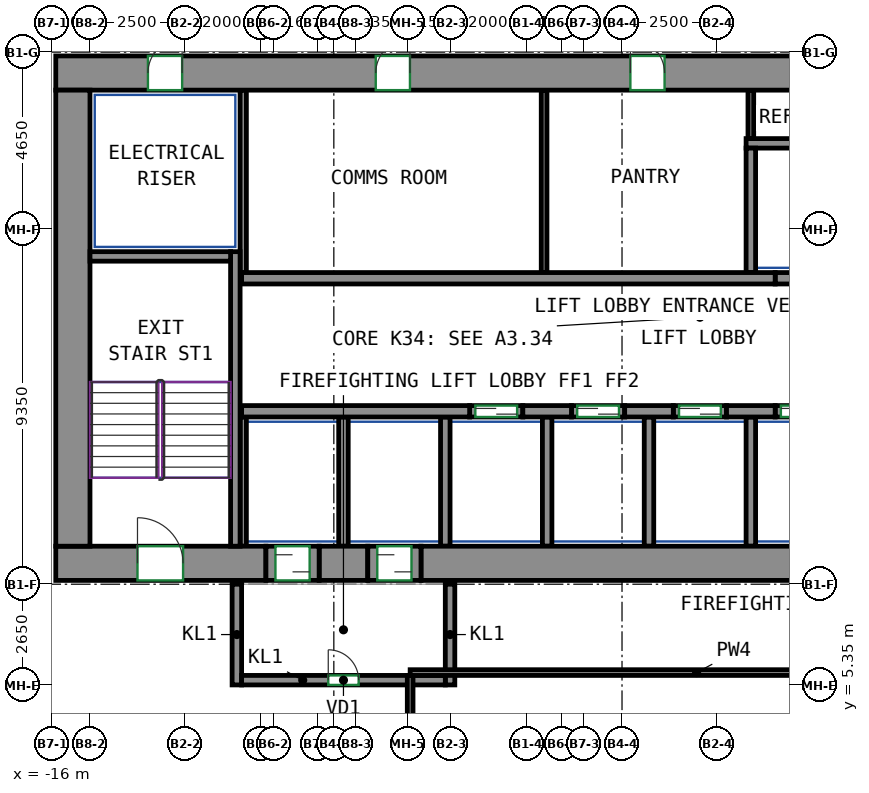
"""IFC4 building model, lengths in metres.
Left out: names, types, materials, properties, quantities, classifications, styles, units other than length and angle.
Written with IfcOpenShell. Run it as: python <this file> out.ifc"""

import sys

from ifc_helpers import new_model, si_unit, direction, frame, frame_2d, origin, place, context, subcontext, project, spatial, rectangle, extrude, source, transform, mapped, element, fill, save


model = new_model("IFC4")
c1 = context("Model", 3, precision=1e-05, world=origin(), true_north=direction((0.0, 1.0)))
c2 = subcontext(c1, "Body", "Model", "MODEL_VIEW")
j1 = project(units=[si_unit("LENGTHUNIT", "METRE"), si_unit("PLANEANGLEUNIT", "RADIAN")], contexts=[c1])
p1 = place(None, origin())
s1 = spatial("IfcSite", under=j1, at=p1, CompositionType="ELEMENT")
p2 = place(p1, origin())
s2 = spatial("IfcBuilding", under=s1, at=p2, CompositionType="ELEMENT")
p3 = place(p2, frame((0.0, 0.0, 147.3)))
s3 = spatial("IfcBuildingStorey", under=s2, at=p3, CompositionType="ELEMENT", Elevation=147.3)
m1 = source(origin(), c2, "Body", "SweptSolid", [
    extrude(rectangle(XDim=5.53, YDim=0.9, at=frame_2d((2.765, 0.0))), origin(), (0.0, 0.0, 1.0), 3.12),
])
p4 = place(p3, frame((-15.9, 8.55, 0.0), z_axis=(0.0, 0.0, 1.0), x_axis=(1.0, 0.0, 0.0)))
e1 = element("IfcWall", 1, at=p4, inside=s3, PredefinedType="SHEAR", context=c2, shape_type="MappedRepresentation", body=[
    mapped(m1, transform((0.0, 0.0, 0.0))),
])
p5 = place(p4, frame((2.15, 0.0, 0.0)))
e2 = element("IfcOpeningElement", 2, at=p5, cuts=e1, PredefinedType="OPENING", context=c2, shape_type="SweptSolid", body=[
    extrude(rectangle(XDim=1.2, YDim=2.1, at=frame_2d((0.6, 1.05))), frame((0.0, 0.46, 0.0), z_axis=(0.0, -1.0, 0.0), x_axis=(1.0, 0.0, 0.0)), (0.0, 0.0, 1.0), 0.92),
])
m2 = source(origin(), c2, "Body", "SweptSolid", [
    extrude(rectangle(XDim=1.28, YDim=0.9, at=frame_2d((0.64, 0.0))), origin(), (0.0, 0.0, 1.0), 3.12),
])
p6 = place(p3, frame((-8.97, 8.55, 0.0), z_axis=(0.0, 0.0, 1.0), x_axis=(1.0, 0.0, 0.0)))
e3 = element("IfcWall", 3, at=p6, inside=s3, PredefinedType="SHEAR", context=c2, shape_type="MappedRepresentation", body=[
    mapped(m2, transform((0.0, 0.0, 0.0))),
])
m3 = source(origin(), c2, "Body", "SweptSolid", [
    extrude(rectangle(XDim=14.18, YDim=0.9, at=frame_2d((7.09, 0.0))), origin(), (0.0, 0.0, 1.0), 3.12),
])
p7 = place(p3, frame((-6.29, 8.55, 0.0), z_axis=(0.0, 0.0, 1.0), x_axis=(1.0, 0.0, 0.0)))
e4 = element("IfcWall", 4, at=p7, inside=s3, PredefinedType="SHEAR", context=c2, shape_type="MappedRepresentation", body=[
    mapped(m3, transform((0.0, 0.0, 0.0))),
])
m4 = source(origin(), c2, "Body", "SweptSolid", [
    extrude(rectangle(XDim=33.9, YDim=0.9, at=frame_2d((16.95, 0.0))), origin(), (0.0, 0.0, 1.0), 3.12),
])
p8 = place(p3, frame((-15.9, 21.45, 0.0), z_axis=(0.0, 0.0, 1.0), x_axis=(1.0, 0.0, 0.0)))
e5 = element("IfcWall", 5, at=p8, inside=s3, PredefinedType="SHEAR", context=c2, shape_type="MappedRepresentation", body=[
    mapped(m4, transform((0.0, 0.0, 0.0))),
])
p9 = place(p8, frame((8.42, 0.0, 0.0)))
e6 = element("IfcOpeningElement", 6, at=p9, cuts=e5, PredefinedType="OPENING", context=c2, shape_type="SweptSolid", body=[
    extrude(rectangle(XDim=0.9, YDim=2.1, at=frame_2d((0.45, 1.05))), frame((0.0, 0.46, 0.0), z_axis=(0.0, -1.0, 0.0), x_axis=(1.0, 0.0, 0.0)), (0.0, 0.0, 1.0), 0.92),
])
p10 = place(p8, frame((15.12, 0.0, 0.0)))
e7 = element("IfcOpeningElement", 7, at=p10, cuts=e5, PredefinedType="OPENING", context=c2, shape_type="SweptSolid", body=[
    extrude(rectangle(XDim=0.9, YDim=2.1, at=frame_2d((0.45, 1.05))), frame((0.0, 0.46, 0.0), z_axis=(0.0, -1.0, 0.0), x_axis=(1.0, 0.0, 0.0)), (0.0, 0.0, 1.0), 0.92),
])
p11 = place(p8, frame((19.944, 0.0, 0.0)))
e8 = element("IfcOpeningElement", 8, at=p11, cuts=e5, PredefinedType="OPENING", context=c2, shape_type="SweptSolid", body=[
    extrude(rectangle(XDim=0.9, YDim=2.1, at=frame_2d((0.45, 1.05))), frame((0.0, 0.46, 0.0), z_axis=(0.0, -1.0, 0.0), x_axis=(1.0, 0.0, 0.0)), (0.0, 0.0, 1.0), 0.92),
])
p12 = place(p8, frame((25.304, 0.0, 0.0)))
e9 = element("IfcOpeningElement", 9, at=p12, cuts=e5, PredefinedType="OPENING", context=c2, shape_type="SweptSolid", body=[
    extrude(rectangle(XDim=0.9, YDim=2.1, at=frame_2d((0.45, 1.05))), frame((0.0, 0.46, 0.0), z_axis=(0.0, -1.0, 0.0), x_axis=(1.0, 0.0, 0.0)), (0.0, 0.0, 1.0), 0.92),
])
p13 = place(p8, frame((2.425, 0.0, 0.0)))
e10 = element("IfcOpeningElement", 10, at=p13, cuts=e5, PredefinedType="OPENING", context=c2, shape_type="SweptSolid", body=[
    extrude(rectangle(XDim=0.9, YDim=2.1, at=frame_2d((0.45, 1.05))), frame((0.0, 0.46, 0.0), z_axis=(0.0, -1.0, 0.0), x_axis=(1.0, 0.0, 0.0)), (0.0, 0.0, 1.0), 0.92),
])
p14 = place(p8, frame((30.575, 0.0, 0.0)))
e11 = element("IfcOpeningElement", 11, at=p14, cuts=e5, PredefinedType="OPENING", context=c2, shape_type="SweptSolid", body=[
    extrude(rectangle(XDim=0.9, YDim=2.1, at=frame_2d((0.45, 1.05))), frame((0.0, 0.46, 0.0), z_axis=(0.0, -1.0, 0.0), x_axis=(1.0, 0.0, 0.0)), (0.0, 0.0, 1.0), 0.92),
])
m5 = source(origin(), c2, "Body", "SweptSolid", [
    extrude(rectangle(XDim=12.0, YDim=0.9, at=frame_2d((6.0, 0.0))), origin(), (0.0, 0.0, 1.0), 3.12),
])
p15 = place(p3, frame((-15.45, 9.0, 0.0), z_axis=(0.0, 0.0, 1.0), x_axis=(0.0, 1.0, 0.0)))
e12 = element("IfcWall", 12, at=p15, inside=s3, PredefinedType="SHEAR", context=c2, shape_type="MappedRepresentation", body=[
    mapped(m5, transform((0.0, 0.0, 0.0))),
])
m6 = source(origin(), c2, "Body", "SweptSolid", [
    extrude(rectangle(XDim=7.75, YDim=0.25, at=frame_2d((3.875, 0.0))), origin(), (0.0, 0.0, 1.0), 3.12),
])
p16 = place(p3, frame((-11.175, 9.0, 0.0), z_axis=(0.0, 0.0, 1.0), x_axis=(0.0, 1.0, 0.0)))
e13 = element("IfcWall", 13, at=p16, inside=s3, PredefinedType="SHEAR", context=c2, shape_type="MappedRepresentation", body=[
    mapped(m6, transform((0.0, 0.0, 0.0))),
])
m7 = source(origin(), c2, "Body", "SweptSolid", [
    extrude(rectangle(XDim=3.7, YDim=0.25, at=frame_2d((1.85, 0.0))), origin(), (0.0, 0.0, 1.0), 3.12),
])
p17 = place(p3, frame((-15.0, 16.625, 0.0), z_axis=(0.0, 0.0, 1.0), x_axis=(1.0, 0.0, 0.0)))
e14 = element("IfcWall", 14, at=p17, inside=s3, PredefinedType="SHEAR", context=c2, shape_type="MappedRepresentation", body=[
    mapped(m7, transform((0.0, 0.0, 0.0))),
])
m8 = source(origin(), c2, "Body", "SweptSolid", [
    extrude(rectangle(XDim=6.0, YDim=0.3, at=frame_2d((3.0, 0.0))), origin(), (0.0, 0.0, 1.0), 3.12),
])
p18 = place(p3, frame((-11.01, 12.55, 0.0), z_axis=(0.0, 0.0, 1.0), x_axis=(1.0, 0.0, 0.0)))
e15 = element("IfcWall", 15, at=p18, inside=s3, PredefinedType="SHEAR", context=c2, shape_type="MappedRepresentation", body=[
    mapped(m8, transform((0.0, 0.0, 0.0))),
])
m9 = source(origin(), c2, "Body", "SweptSolid", [
    extrude(rectangle(XDim=1.28, YDim=0.3, at=frame_2d((0.64, 0.0))), origin(), (0.0, 0.0, 1.0), 3.12),
])
for number, where, z_axis, x_axis in (
    (16, (-3.61, 12.55, 0.0), (0.0, 0.0, 1.0), (1.0, 0.0, 0.0)),
    (17, (-0.93, 12.55, 0.0), (0.0, 0.0, 1.0), (1.0, 0.0, 0.0)),
    (18, (1.75, 12.55, 0.0), (0.0, 0.0, 1.0), (1.0, 0.0, 0.0)),
):
    element("IfcWall", number, at=place(p3, frame(where, z_axis=z_axis, x_axis=x_axis)), inside=s3, PredefinedType="SHEAR", context=c2, shape_type="MappedRepresentation", body=[
        mapped(m9, transform((0.0, 0.0, 0.0))),
    ])
m10 = source(origin(), c2, "Body", "SweptSolid", [
    extrude(rectangle(XDim=14.04, YDim=0.3, at=frame_2d((7.02, 0.0))), origin(), (0.0, 0.0, 1.0), 3.12),
])
p19 = place(p3, frame((-11.01, 16.05, 0.0), z_axis=(0.0, 0.0, 1.0), x_axis=(1.0, 0.0, 0.0)))
e19 = element("IfcWall", 19, at=p19, inside=s3, PredefinedType="SHEAR", context=c2, shape_type="MappedRepresentation", body=[
    mapped(m10, transform((0.0, 0.0, 0.0))),
])
m11 = source(origin(), c2, "Body", "SweptSolid", [
    extrude(rectangle(XDim=1.4, YDim=0.3, at=frame_2d((0.7, 0.0))), origin(), (0.0, 0.0, 1.0), 3.12),
])
p20 = place(p3, frame((-5.01, 12.55, 0.0), z_axis=(0.0, 0.0, 1.0), x_axis=(1.0, 0.0, 0.0)))
e20 = element("IfcWall", 20, at=p20, inside=s3, PredefinedType="PARTITIONING", context=c2, shape_type="MappedRepresentation", body=[
    mapped(m11, transform((0.0, 0.0, 0.0))),
])
p21 = place(p20, frame((0.15, 0.0, 0.0)))
e21 = element("IfcOpeningElement", 21, at=p21, cuts=e20, PredefinedType="OPENING", context=c2, shape_type="SweptSolid", body=[
    extrude(rectangle(XDim=1.1, YDim=2.1, at=frame_2d((0.55, 1.05))), frame((0.0, 0.16, 0.0), z_axis=(0.0, -1.0, 0.0), x_axis=(1.0, 0.0, 0.0)), (0.0, 0.0, 1.0), 0.32),
])
m12 = source(origin(), c2, "Body", "SweptSolid", [
    extrude(rectangle(XDim=1.4, YDim=0.3, at=frame_2d((0.7, 0.0))), origin(), (0.0, 0.0, 1.0), 3.12),
])
p22 = place(p3, frame((-2.33, 12.55, 0.0), z_axis=(0.0, 0.0, 1.0), x_axis=(1.0, 0.0, 0.0)))
e22 = element("IfcWall", 22, at=p22, inside=s3, PredefinedType="PARTITIONING", context=c2, shape_type="MappedRepresentation", body=[
    mapped(m12, transform((0.0, 0.0, 0.0))),
])
p23 = place(p22, frame((0.15, 0.0, 0.0)))
e23 = element("IfcOpeningElement", 23, at=p23, cuts=e22, PredefinedType="OPENING", context=c2, shape_type="SweptSolid", body=[
    extrude(rectangle(XDim=1.1, YDim=2.1, at=frame_2d((0.55, 1.05))), frame((0.0, 0.16, 0.0), z_axis=(0.0, -1.0, 0.0), x_axis=(1.0, 0.0, 0.0)), (0.0, 0.0, 1.0), 0.32),
])
p24 = place(p3, frame((0.35, 12.55, 0.0), z_axis=(0.0, 0.0, 1.0), x_axis=(1.0, 0.0, 0.0)))
e24 = element("IfcWall", 24, at=p24, inside=s3, PredefinedType="PARTITIONING", context=c2, shape_type="MappedRepresentation", body=[
    mapped(m11, transform((0.0, 0.0, 0.0))),
])
p25 = place(p24, frame((0.15, 0.0, 0.0)))
e25 = element("IfcOpeningElement", 25, at=p25, cuts=e24, PredefinedType="OPENING", context=c2, shape_type="SweptSolid", body=[
    extrude(rectangle(XDim=1.1, YDim=2.1, at=frame_2d((0.55, 1.05))), frame((0.0, 0.16, 0.0), z_axis=(0.0, -1.0, 0.0), x_axis=(1.0, 0.0, 0.0)), (0.0, 0.0, 1.0), 0.32),
])
p26 = place(p3, frame((3.03, 12.55, 0.0), z_axis=(0.0, 0.0, 1.0), x_axis=(1.0, 0.0, 0.0)))
e26 = element("IfcWall", 26, at=p26, inside=s3, PredefinedType="PARTITIONING", context=c2, shape_type="MappedRepresentation", body=[
    mapped(m11, transform((0.0, 0.0, 0.0))),
])
p27 = place(p26, frame((0.15, 0.0, 0.0)))
e27 = element("IfcOpeningElement", 27, at=p27, cuts=e26, PredefinedType="OPENING", context=c2, shape_type="SweptSolid", body=[
    extrude(rectangle(XDim=1.1, YDim=2.1, at=frame_2d((0.55, 1.05))), frame((0.0, 0.16, 0.0), z_axis=(0.0, -1.0, 0.0), x_axis=(1.0, 0.0, 0.0)), (0.0, 0.0, 1.0), 0.32),
])
p28 = place(p3, frame((3.03, 16.05, 0.0), z_axis=(0.0, 0.0, 1.0), x_axis=(1.0, 0.0, 0.0)))
e28 = element("IfcWall", 28, at=p28, inside=s3, PredefinedType="PARTITIONING", context=c2, shape_type="MappedRepresentation", body=[
    mapped(m11, transform((0.0, 0.0, 0.0))),
])
m13 = source(origin(), c2, "Body", "SweptSolid", [
    extrude(rectangle(XDim=2.65, YDim=0.25, at=frame_2d((1.325, 0.0))), origin(), (0.0, 0.0, 1.0), 3.12),
])
for number, where, z_axis, x_axis in (
    (29, (-11.135, 5.35, 0.0), (0.0, 0.0, 1.0), (0.0, 1.0, 0.0)),
    (30, (-5.525, 5.35, 0.0), (0.0, 0.0, 1.0), (0.0, 1.0, 0.0)),
):
    element("IfcWall", number, at=place(p3, frame(where, z_axis=z_axis, x_axis=x_axis)), inside=s3, PredefinedType="PARTITIONING", context=c2, shape_type="MappedRepresentation", body=[
        mapped(m13, transform((0.0, 0.0, 0.0))),
    ])
m14 = source(origin(), c2, "Body", "SweptSolid", [
    extrude(rectangle(XDim=5.36, YDim=0.25, at=frame_2d((2.68, 0.0))), origin(), (0.0, 0.0, 1.0), 3.12),
])
p29 = place(p3, frame((-11.01, 5.475, 0.0), z_axis=(0.0, 0.0, 1.0), x_axis=(1.0, 0.0, 0.0)))
e31 = element("IfcWall", 31, at=p29, inside=s3, PredefinedType="PARTITIONING", context=c2, shape_type="MappedRepresentation", body=[
    mapped(m14, transform((0.0, 0.0, 0.0))),
])
p30 = place(p29, frame((2.28, 0.0, 0.0)))
e32 = element("IfcOpeningElement", 32, at=p30, cuts=e31, PredefinedType="OPENING", context=c2, shape_type="SweptSolid", body=[
    extrude(rectangle(XDim=0.8, YDim=2.0, at=frame_2d((0.4, 1.0))), frame((0.0, 0.135, 0.0), z_axis=(0.0, -1.0, 0.0), x_axis=(1.0, 0.0, 0.0)), (0.0, 0.0, 1.0), 0.27),
])
m15 = source(origin(), c2, "Body", "SweptSolid", [
    extrude(rectangle(XDim=10.97, YDim=0.25, at=frame_2d((5.485, 0.0))), origin(), (0.0, 0.0, 1.0), 3.12),
])
p31 = place(p3, frame((2.265, 19.6, 0.0), z_axis=(0.0, 0.0, 1.0), x_axis=(1.0, 0.0, 0.0)))
e33 = element("IfcWall", 33, at=p31, inside=s3, PredefinedType="PARTITIONING", context=c2, shape_type="MappedRepresentation", body=[
    mapped(m15, transform((0.0, 0.0, 0.0))),
])
m16 = source(origin(), c2, "Body", "SweptSolid", [
    extrude(rectangle(XDim=4.8, YDim=0.165, at=frame_2d((2.4, 0.0))), origin(), (0.0, 0.0, 1.0), 3.12),
])
p32 = place(p3, frame((-10.968, 16.2, 0.0), z_axis=(0.0, 0.0, 1.0), x_axis=(0.0, 1.0, 0.0)))
e34 = element("IfcWall", 34, at=p32, inside=s3, PredefinedType="PARTITIONING", context=c2, shape_type="MappedRepresentation", body=[
    mapped(m16, transform((0.0, 0.0, 0.0))),
])
m17 = source(origin(), c2, "Body", "SweptSolid", [
    extrude(rectangle(XDim=3.275, YDim=0.25, at=frame_2d((1.638, 0.0))), origin(), (0.0, 0.0, 1.0), 3.12),
])
p33 = place(p3, frame((2.39, 16.2, 0.0), z_axis=(0.0, 0.0, 1.0), x_axis=(0.0, 1.0, 0.0)))
e35 = element("IfcWall", 35, at=p33, inside=s3, PredefinedType="PARTITIONING", context=c2, shape_type="MappedRepresentation", body=[
    mapped(m17, transform((0.0, 0.0, 0.0))),
])
m18 = source(origin(), c2, "Body", "SweptSolid", [
    extrude(rectangle(XDim=3.4, YDim=0.25, at=frame_2d((1.7, 0.0))), origin(), (0.0, 0.0, 1.0), 3.12),
])
for number, where, z_axis, x_axis in (
    (36, (2.39, 9.0, 0.0), (0.0, 0.0, 1.0), (0.0, 1.0, 0.0)),
    (37, (-0.29, 9.0, 0.0), (0.0, 0.0, 1.0), (0.0, 1.0, 0.0)),
):
    element("IfcWall", number, at=place(p3, frame(where, z_axis=z_axis, x_axis=x_axis)), inside=s3, PredefinedType="PARTITIONING", context=c2, shape_type="MappedRepresentation", body=[
        mapped(m18, transform((0.0, 0.0, 0.0))),
    ])
m19 = source(origin(), c2, "Body", "SweptSolid", [
    extrude(rectangle(XDim=3.4, YDim=0.165, at=frame_2d((1.7, 0.0))), origin(), (0.0, 0.0, 1.0), 3.12),
])
p34 = place(p3, frame((-10.968, 9.0, 0.0), z_axis=(0.0, 0.0, 1.0), x_axis=(0.0, 1.0, 0.0)))
e38 = element("IfcWall", 38, at=p34, inside=s3, PredefinedType="PARTITIONING", context=c2, shape_type="MappedRepresentation", body=[
    mapped(m19, transform((0.0, 0.0, 0.0))),
])
for number, where, z_axis, x_axis in (
    (39, (-2.97, 9.0, 0.0), (0.0, 0.0, 1.0), (0.0, 1.0, 0.0)),
    (40, (-5.65, 9.0, 0.0), (0.0, 0.0, 1.0), (0.0, 1.0, 0.0)),
    (41, (-8.33, 9.0, 0.0), (0.0, 0.0, 1.0), (0.0, 1.0, 0.0)),
):
    element("IfcWall", number, at=place(p3, frame(where, z_axis=z_axis, x_axis=x_axis)), inside=s3, PredefinedType="PARTITIONING", context=c2, shape_type="MappedRepresentation", body=[
        mapped(m18, transform((0.0, 0.0, 0.0))),
    ])
m20 = source(origin(), c2, "Body", "SweptSolid", [
    extrude(rectangle(XDim=4.8, YDim=0.15, at=frame_2d((2.4, 0.0))), origin(), (0.0, 0.0, 1.0), 3.12),
])
p35 = place(p3, frame((-3.05, 16.2, 0.0), z_axis=(0.0, 0.0, 1.0), x_axis=(0.0, 1.0, 0.0)))
e42 = element("IfcWall", 42, at=p35, inside=s3, PredefinedType="PARTITIONING", context=c2, shape_type="MappedRepresentation", body=[
    mapped(m20, transform((0.0, 0.0, 0.0))),
])
m21 = source(origin(), c2, "Body", "SweptSolid", [
    extrude(rectangle(XDim=1.275, YDim=0.15, at=frame_2d((0.637, 0.0))), origin(), (0.0, 0.0, 1.0), 3.12),
])
p36 = place(p3, frame((2.39, 19.725, 0.0), z_axis=(0.0, 0.0, 1.0), x_axis=(0.0, 1.0, 0.0)))
e43 = element("IfcWall", 43, at=p36, inside=s3, PredefinedType="PARTITIONING", context=c2, shape_type="MappedRepresentation", body=[
    mapped(m21, transform((0.0, 0.0, 0.0))),
])
m22 = source(origin(), c2, "Body", "SweptSolid", [
    extrude(rectangle(XDim=1.4, YDim=0.9, at=frame_2d((0.7, 0.0))), origin(), (0.0, 0.0, 1.0), 2.7),
])
p37 = place(p3, frame((-10.37, 8.55, 0.0), z_axis=(0.0, 0.0, 1.0), x_axis=(1.0, 0.0, 0.0)))
e44 = element("IfcWall", 44, at=p37, inside=s3, PredefinedType="PARTITIONING", context=c2, shape_type="MappedRepresentation", body=[
    mapped(m22, transform((0.0, 0.0, 0.0))),
])
p38 = place(p37, frame((0.25, 0.0, 0.0)))
e45 = element("IfcOpeningElement", 45, at=p38, cuts=e44, PredefinedType="OPENING", context=c2, shape_type="SweptSolid", body=[
    extrude(rectangle(XDim=0.9, YDim=2.1, at=frame_2d((0.45, 1.05))), frame((0.0, 0.46, 0.0), z_axis=(0.0, -1.0, 0.0), x_axis=(1.0, 0.0, 0.0)), (0.0, 0.0, 1.0), 0.92),
])
m23 = source(origin(), c2, "Body", "SweptSolid", [
    extrude(rectangle(XDim=1.4, YDim=0.9, at=frame_2d((0.7, 0.0))), origin(), (0.0, 0.0, 1.0), 2.7),
])
p39 = place(p3, frame((-7.69, 8.55, 0.0), z_axis=(0.0, 0.0, 1.0), x_axis=(1.0, 0.0, 0.0)))
e46 = element("IfcWall", 46, at=p39, inside=s3, PredefinedType="PARTITIONING", context=c2, shape_type="MappedRepresentation", body=[
    mapped(m23, transform((0.0, 0.0, 0.0))),
])
p40 = place(p39, frame((0.25, 0.0, 0.0)))
e47 = element("IfcOpeningElement", 47, at=p40, cuts=e46, PredefinedType="OPENING", context=c2, shape_type="SweptSolid", body=[
    extrude(rectangle(XDim=0.9, YDim=2.1, at=frame_2d((0.45, 1.05))), frame((0.0, 0.46, 0.0), z_axis=(0.0, -1.0, 0.0), x_axis=(1.0, 0.0, 0.0)), (0.0, 0.0, 1.0), 0.92),
])
p41 = place(p3, frame((-6.575, -9.4, 0.0), z_axis=(0.0, 0.0, 1.0), x_axis=(0.0, 1.0, 0.0)))
e48 = element("IfcWall", 48, at=p41, inside=s3, PredefinedType="PARTITIONING", context=c2, shape_type="SweptSolid", body=[
    extrude(rectangle(XDim=15.0, YDim=0.15, at=frame_2d((7.5, 0.0))), origin(), (0.0, 0.0, 1.0), 3.12),
])
p42 = place(p3, frame((-6.575, 5.675, 0.0), z_axis=(0.0, 0.0, 1.0), x_axis=(1.0, 0.0, 0.0)))
e49 = element("IfcWall", 49, at=p42, inside=s3, PredefinedType="PARTITIONING", context=c2, shape_type="SweptSolid", body=[
    extrude(rectangle(XDim=15.075, YDim=0.15, at=frame_2d((7.538, 0.0))), origin(), (0.0, 0.0, 1.0), 3.12),
])
p43 = place(p30, origin())
e50 = element("IfcDoor", 50, at=p43, inside=s3, OperationType="SINGLE_SWING_LEFT", PredefinedType="DOOR", context=c2, shape_type="SweptSolid", body=[
    extrude(rectangle(XDim=0.8, YDim=2.0, at=frame_2d((0.4, 1.0))), frame((0.0, 0.025, 0.0), z_axis=(0.0, -1.0, 0.0), x_axis=(1.0, 0.0, 0.0)), (0.0, 0.0, 1.0), 0.05),
])
fill(e32, e50)
p44 = place(p38, origin())
e51 = element("IfcDoor", 51, at=p44, inside=s3, OperationType="SLIDING_TO_LEFT", PredefinedType="DOOR", context=c2, shape_type="SweptSolid", body=[
    extrude(rectangle(XDim=0.9, YDim=2.1, at=frame_2d((0.45, 1.05))), frame((0.0, 0.355, 0.0), z_axis=(0.0, -1.0, 0.0), x_axis=(1.0, 0.0, 0.0)), (0.0, 0.0, 1.0), 0.05),
])
fill(e45, e51)
p45 = place(p40, origin())
e52 = element("IfcDoor", 52, at=p45, inside=s3, OperationType="SLIDING_TO_RIGHT", PredefinedType="DOOR", context=c2, shape_type="SweptSolid", body=[
    extrude(rectangle(XDim=0.9, YDim=2.1, at=frame_2d((0.45, 1.05))), frame((0.0, 0.355, 0.0), z_axis=(0.0, -1.0, 0.0), x_axis=(1.0, 0.0, 0.0)), (0.0, 0.0, 1.0), 0.05),
])
fill(e47, e52)
p46 = place(p21, origin())
e53 = element("IfcDoor", 53, at=p46, inside=s3, OperationType="DOUBLE_DOOR_SLIDING", PredefinedType="DOOR", context=c2, shape_type="SweptSolid", body=[
    extrude(rectangle(XDim=1.1, YDim=2.1, at=frame_2d((0.55, 1.05))), frame((0.0, 0.025, 0.0), z_axis=(0.0, -1.0, 0.0), x_axis=(1.0, 0.0, 0.0)), (0.0, 0.0, 1.0), 0.05),
])
fill(e21, e53)
p47 = place(p23, origin())
e54 = element("IfcDoor", 54, at=p47, inside=s3, OperationType="DOUBLE_DOOR_SLIDING", PredefinedType="DOOR", context=c2, shape_type="SweptSolid", body=[
    extrude(rectangle(XDim=1.1, YDim=2.1, at=frame_2d((0.55, 1.05))), frame((0.0, 0.025, 0.0), z_axis=(0.0, -1.0, 0.0), x_axis=(1.0, 0.0, 0.0)), (0.0, 0.0, 1.0), 0.05),
])
fill(e23, e54)
p48 = place(p25, origin())
e55 = element("IfcDoor", 55, at=p48, inside=s3, OperationType="DOUBLE_DOOR_SLIDING", PredefinedType="DOOR", context=c2, shape_type="SweptSolid", body=[
    extrude(rectangle(XDim=1.1, YDim=2.1, at=frame_2d((0.55, 1.05))), frame((0.0, 0.025, 0.0), z_axis=(0.0, -1.0, 0.0), x_axis=(1.0, 0.0, 0.0)), (0.0, 0.0, 1.0), 0.05),
])
fill(e25, e55)
p49 = place(p27, origin())
e56 = element("IfcDoor", 56, at=p49, inside=s3, OperationType="DOUBLE_DOOR_SLIDING", PredefinedType="DOOR", context=c2, shape_type="SweptSolid", body=[
    extrude(rectangle(XDim=1.1, YDim=2.1, at=frame_2d((0.55, 1.05))), frame((0.0, 0.025, 0.0), z_axis=(0.0, -1.0, 0.0), x_axis=(1.0, 0.0, 0.0)), (0.0, 0.0, 1.0), 0.05),
])
fill(e27, e56)
p50 = place(p9, origin())
e57 = element("IfcDoor", 57, at=p50, inside=s3, OperationType="SINGLE_SWING_RIGHT", PredefinedType="DOOR", context=c2, shape_type="SweptSolid", body=[
    extrude(rectangle(XDim=0.9, YDim=2.1, at=frame_2d((0.45, 1.05))), frame((0.0, -0.305, 0.0), z_axis=(0.0, -1.0, 0.0), x_axis=(1.0, 0.0, 0.0)), (0.0, 0.0, 1.0), 0.05),
])
fill(e6, e57)
p51 = place(p10, origin())
e58 = element("IfcDoor", 58, at=p51, inside=s3, OperationType="SINGLE_SWING_LEFT", PredefinedType="DOOR", context=c2, shape_type="SweptSolid", body=[
    extrude(rectangle(XDim=0.9, YDim=2.1, at=frame_2d((0.45, 1.05))), frame((0.0, -0.305, 0.0), z_axis=(0.0, -1.0, 0.0), x_axis=(1.0, 0.0, 0.0)), (0.0, 0.0, 1.0), 0.05),
])
fill(e7, e58)
p52 = place(p13, origin())
e59 = element("IfcDoor", 59, at=p52, inside=s3, OperationType="SINGLE_SWING_RIGHT", PredefinedType="DOOR", context=c2, shape_type="SweptSolid", body=[
    extrude(rectangle(XDim=0.9, YDim=2.1, at=frame_2d((0.45, 1.05))), frame((0.0, -0.305, 0.0), z_axis=(0.0, -1.0, 0.0), x_axis=(1.0, 0.0, 0.0)), (0.0, 0.0, 1.0), 0.05),
])
fill(e10, e59)
p53 = place(p5, origin())
e60 = element("IfcDoor", 60, at=p53, inside=s3, OperationType="DOUBLE_DOOR_SINGLE_SWING", PredefinedType="DOOR", context=c2, shape_type="SweptSolid", body=[
    extrude(rectangle(XDim=1.2, YDim=2.1, at=frame_2d((0.6, 1.05))), frame((0.0, 0.355, 0.0), z_axis=(0.0, -1.0, 0.0), x_axis=(1.0, 0.0, 0.0)), (0.0, 0.0, 1.0), 0.05),
])
fill(e2, e60)
save(model, sys.argv[1])
